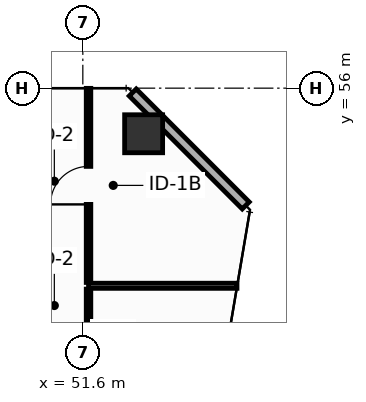
"""IFC4 building model, lengths in metres.
Left out: names, types, materials, properties, quantities, classifications, styles, units other than length and angle.
Written with IfcOpenShell. Run it as: python <this file> out.ifc"""

import sys

from ifc_helpers import new_model, si_unit, direction, frame, frame_2d, origin, origin_2d, place, context, subcontext, project, spatial, rectangle, hollow_rectangle, extrude, element, fill, save


model = new_model("IFC4")
c1 = context("Model", 3, precision=1e-05, world=origin(), true_north=direction((0.0, 1.0)))
c2 = subcontext(c1, "Body", "Model", "MODEL_VIEW")
j1 = project(units=[si_unit("LENGTHUNIT", "METRE"), si_unit("PLANEANGLEUNIT", "RADIAN")], contexts=[c1])
p1 = place(None, origin())
s1 = spatial("IfcSite", under=j1, at=p1, CompositionType="ELEMENT")
p2 = place(p1, origin())
s2 = spatial("IfcBuilding", under=s1, at=p2, CompositionType="ELEMENT")
p3 = place(p2, frame((0.0, 0.0, 171.4)))
s3 = spatial("IfcBuildingStorey", under=s2, at=p3, CompositionType="ELEMENT", Elevation=171.4)
p4 = place(p3, frame((53.2, 54.8, 0.0), z_axis=(0.0, 0.0, 1.0), x_axis=(1.0, 0.0, 0.0)))
e1 = element("IfcColumn", 1, at=p4, inside=s3, PredefinedType="COLUMN", context=c2, shape_type="SweptSolid", body=[
    extrude(hollow_rectangle(XDim=1.0, YDim=1.0, WallThickness=0.045, at=origin_2d()), origin(), (0.0, 0.0, 1.0), 3.8),
])
p5 = place(p3, frame((55.887, 52.913, 0.0), z_axis=(0.0, 0.0, 1.0), x_axis=(-0.707106781187, 0.707106781187, 0.0)))
e2 = element("IfcWall", 2, at=p5, inside=s3, PredefinedType="STANDARD", context=c2, shape_type="SweptSolid", body=[
    extrude(rectangle(XDim=4.206, YDim=0.26, at=frame_2d((2.103, 0.0))), origin(), (0.0, 0.0, 1.0), 3.55),
])
p6 = place(p3, frame((51.75, 50.8, 0.0), z_axis=(0.0, 0.0, 1.0), x_axis=(1.0, 0.0, 0.0)))
e3 = element("IfcWall", 3, at=p6, inside=s3, PredefinedType="PARTITIONING", context=c2, shape_type="SweptSolid", body=[
    extrude(rectangle(XDim=3.906, YDim=0.135, at=frame_2d((1.953, 0.0))), origin(), (0.0, 0.0, 1.0), 2.835),
])
p7 = place(p3, frame((51.75, 46.087, 0.0), z_axis=(0.0, 0.0, 1.0), x_axis=(0.0, 1.0, 0.0)))
e4 = element("IfcWall", 4, at=p7, inside=s3, PredefinedType="PARTITIONING", context=c2, shape_type="SweptSolid", body=[
    extrude(rectangle(XDim=4.625, YDim=0.12, at=frame_2d((2.312, 0.0))), origin(), (0.0, 0.0, 1.0), 3.55),
])
p8 = place(p7, frame((1.788, 0.0, 0.0)))
e5 = element("IfcOpeningElement", 5, at=p8, cuts=e4, PredefinedType="OPENING", context=c2, shape_type="SweptSolid", body=[
    extrude(rectangle(XDim=1.05, YDim=2.15, at=frame_2d((0.525, 1.075))), frame((0.0, 0.07, 0.0), z_axis=(0.0, -1.0, 0.0), x_axis=(1.0, 0.0, 0.0)), (0.0, 0.0, 1.0), 0.14),
])
p9 = place(p3, frame((51.75, 50.887, 0.0), z_axis=(0.0, 0.0, 1.0), x_axis=(0.0, 1.0, 0.0)))
e6 = element("IfcWall", 6, at=p9, inside=s3, PredefinedType="PARTITIONING", context=c2, shape_type="SweptSolid", body=[
    extrude(rectangle(XDim=5.108, YDim=0.12, at=frame_2d((2.554, 0.0))), origin(), (0.0, 0.0, 1.0), 2.935),
])
p10 = place(p9, frame((2.054, 0.0, 0.0)))
e7 = element("IfcOpeningElement", 7, at=p10, cuts=e6, PredefinedType="OPENING", context=c2, shape_type="SweptSolid", body=[
    extrude(rectangle(XDim=1.0, YDim=2.15, at=frame_2d((0.5, 1.075))), frame((0.0, 0.07, 0.0), z_axis=(0.0, -1.0, 0.0), x_axis=(1.0, 0.0, 0.0)), (0.0, 0.0, 1.0), 0.14),
])
p11 = place(p10, origin())
e8 = element("IfcDoor", 8, at=p11, inside=s3, OperationType="SINGLE_SWING_LEFT", PredefinedType="DOOR", context=c2, shape_type="SweptSolid", body=[
    extrude(rectangle(XDim=1.0, YDim=2.15, at=frame_2d((0.5, 1.075))), frame((0.0, 0.025, 0.0), z_axis=(0.0, -1.0, 0.0), x_axis=(1.0, 0.0, 0.0)), (0.0, 0.0, 1.0), 0.05),
])
fill(e7, e8)
save(model, sys.argv[1])
